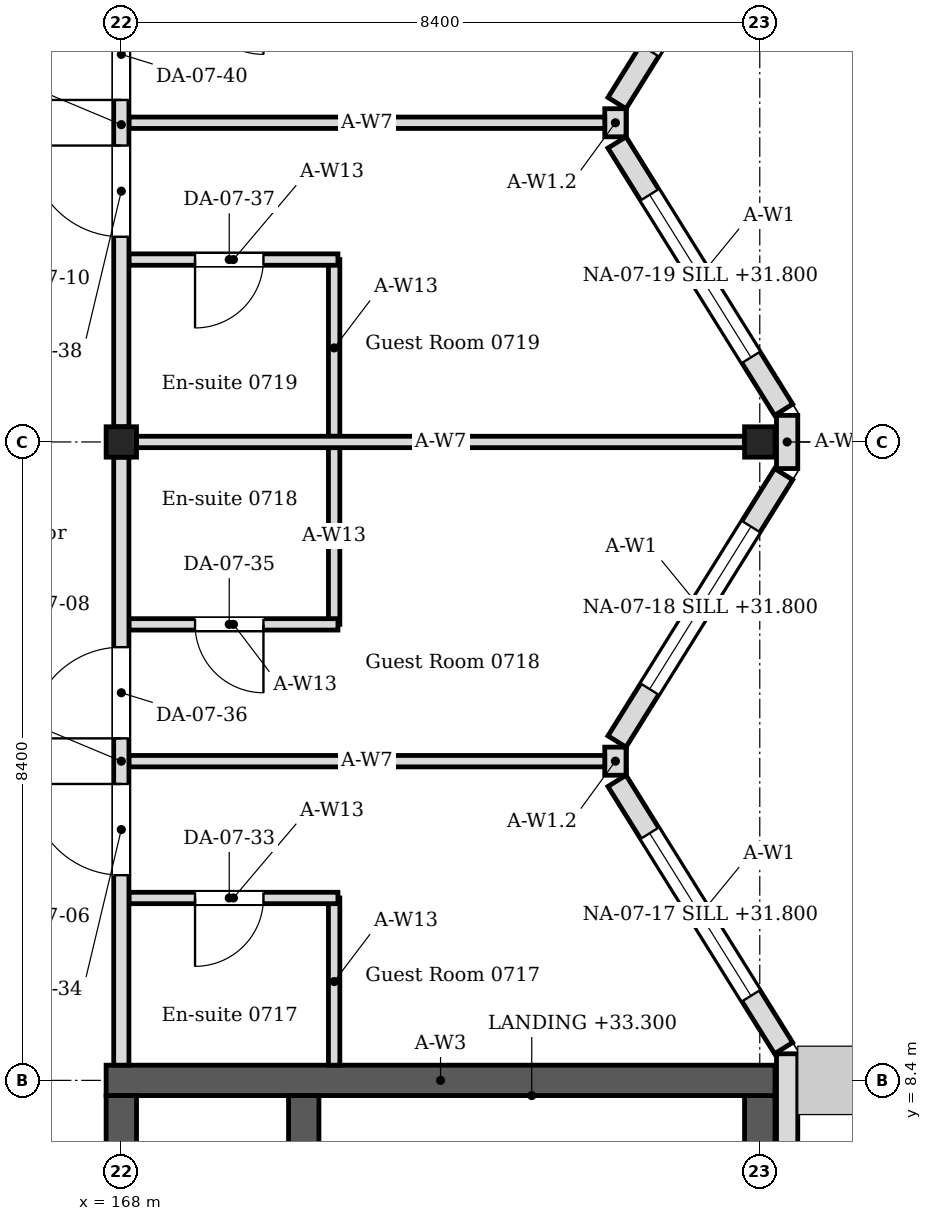
"""IFC4 building model, lengths in metres.
Left out: names, types, materials, properties, quantities, classifications, styles, units other than length and angle.
Written with IfcOpenShell. Run it as: python <this file> out.ifc"""

import sys

from ifc_helpers import new_model, si_unit, direction, frame, frame_2d, origin, origin_2d, place, context, subcontext, project, spatial, rectangle, i_section, extrude, element, fill, save


model = new_model("IFC4")
c1 = context("Model", 3, precision=1e-05, world=origin(), true_north=direction((0.0, 1.0)))
c2 = subcontext(c1, "Body", "Model", "MODEL_VIEW")
j1 = project(units=[si_unit("LENGTHUNIT", "METRE"), si_unit("PLANEANGLEUNIT", "RADIAN")], contexts=[c1])
p1 = place(None, origin())
s1 = spatial("IfcSite", under=j1, at=p1, CompositionType="ELEMENT")
p2 = place(p1, origin())
s2 = spatial("IfcBuilding", under=s1, at=p2, CompositionType="ELEMENT")
p3 = place(p2, frame((0.0, 0.0, 31.2)))
s3 = spatial("IfcBuildingStorey", under=s2, at=p3, CompositionType="ELEMENT", Elevation=31.2)
for number, where, z_axis, x_axis in (
    (1, (168.0, 16.8, 0.0), (0.0, 0.0, 1.0), (1.0, 0.0, 0.0)),
    (2, (176.4, 16.8, 0.0), (0.0, 0.0, 1.0), (1.0, 0.0, 0.0)),
):
    element("IfcColumn", number, at=place(p3, frame(where, z_axis=z_axis, x_axis=x_axis)), inside=s3, PredefinedType="COLUMN", context=c2, shape_type="SweptSolid", body=[
        extrude(i_section(OverallWidth=0.4, OverallDepth=0.4, WebThickness=0.013, FlangeThickness=0.021, FilletRadius=0.022, at=origin_2d()), origin(), (0.0, 0.0, 1.0), 4.2),
    ])
p4 = place(p3, frame((167.8, 8.4, 0.0), z_axis=(0.0, 0.0, 1.0), x_axis=(1.0, 0.0, 0.0)))
e3 = element("IfcWall", 3, at=p4, inside=s3, PredefinedType="SOLIDWALL", context=c2, shape_type="SweptSolid", body=[
    extrude(rectangle(XDim=8.8, YDim=0.4, at=frame_2d((4.4, 0.0))), origin(), (0.0, 0.0, 1.0), 4.05),
])
p5 = place(p3, frame((168.0, 0.2, 0.0), z_axis=(0.0, 0.0, 1.0), x_axis=(0.0, 1.0, 0.0)))
e4 = element("IfcWall", 4, at=p5, inside=s3, PredefinedType="SOLIDWALL", context=c2, shape_type="SweptSolid", body=[
    extrude(rectangle(XDim=8.0, YDim=0.4, at=frame_2d((4.0, 0.0))), origin(), (0.0, 0.0, 1.0), 4.05),
])
p6 = place(p5, frame((1.75, 0.0, 0.0)))
e5 = element("IfcOpeningElement", 5, at=p6, cuts=e4, PredefinedType="OPENING", context=c2, shape_type="SweptSolid", body=[
    extrude(rectangle(XDim=1.0, YDim=2.1, at=frame_2d((0.5, 1.05))), frame((0.0, 0.21, 0.0), z_axis=(0.0, -1.0, 0.0), x_axis=(1.0, 0.0, 0.0)), (0.0, 0.0, 1.0), 0.42),
])
p7 = place(p5, frame((5.675, 0.0, 0.0)))
e6 = element("IfcOpeningElement", 6, at=p7, cuts=e4, PredefinedType="OPENING", context=c2, shape_type="SweptSolid", body=[
    extrude(rectangle(XDim=1.05, YDim=2.1, at=frame_2d((0.525, 1.05))), frame((0.0, 0.21, 0.0), z_axis=(0.0, -1.0, 0.0), x_axis=(1.0, 0.0, 0.0)), (0.0, 0.0, 1.0), 0.42),
])
p8 = place(p3, frame((176.4, 0.2, 0.0), z_axis=(0.0, 0.0, 1.0), x_axis=(0.0, 1.0, 0.0)))
e7 = element("IfcWall", 7, at=p8, inside=s3, PredefinedType="SOLIDWALL", context=c2, shape_type="SweptSolid", body=[
    extrude(rectangle(XDim=8.0, YDim=0.4, at=frame_2d((4.0, 0.0))), origin(), (0.0, 0.0, 1.0), 4.05),
])
p9 = place(p3, frame((176.76, -0.22, 0.0), z_axis=(0.0, 0.0, 1.0), x_axis=(0.0, 1.0, 0.0)))
e8 = element("IfcWall", 8, at=p9, inside=s3, PredefinedType="SOLIDWALL", context=c2, shape_type="SweptSolid", body=[
    extrude(rectangle(XDim=8.97, YDim=0.28, at=frame_2d((4.485, 0.0))), origin(), (0.0, 0.0, 1.0), 4.05),
])
p10 = place(p3, frame((176.714, 8.824, 0.0), z_axis=(0.0, 0.0, 1.0), x_axis=(-0.529018946142, 0.848610013271, 0.0)))
e9 = element("IfcWall", 9, at=p10, inside=s3, PredefinedType="SOLIDWALL", context=c2, shape_type="SweptSolid", body=[
    extrude(rectangle(XDim=4.144, YDim=0.28, at=frame_2d((2.072, 0.0))), origin(), (0.0, 0.0, 1.0), 4.05),
])
p11 = place(p10, frame((0.812, 0.0, 0.6)))
e10 = element("IfcOpeningElement", 10, at=p11, cuts=e9, PredefinedType="OPENING", context=c2, shape_type="SweptSolid", body=[
    extrude(rectangle(XDim=2.52, YDim=2.4, at=frame_2d((1.26, 1.2))), frame((0.0, 0.15, 0.0), z_axis=(0.0, -1.0, 0.0), x_axis=(1.0, 0.0, 0.0)), (0.0, 0.0, 1.0), 0.3),
])
p12 = place(p3, frame((174.521, 12.859, 0.0), z_axis=(0.0, 0.0, 1.0), x_axis=(0.528992500338, 0.848626498871, 0.0)))
e11 = element("IfcWall", 11, at=p12, inside=s3, PredefinedType="SOLIDWALL", context=c2, shape_type="SweptSolid", body=[
    extrude(rectangle(XDim=4.145, YDim=0.28, at=frame_2d((2.072, 0.0))), origin(), (0.0, 0.0, 1.0), 4.05),
])
p13 = place(p12, frame((0.812, 0.0, 0.6)))
e12 = element("IfcOpeningElement", 12, at=p13, cuts=e11, PredefinedType="OPENING", context=c2, shape_type="SweptSolid", body=[
    extrude(rectangle(XDim=2.52, YDim=2.4, at=frame_2d((1.26, 1.2))), frame((0.0, 0.15, 0.0), z_axis=(0.0, -1.0, 0.0), x_axis=(1.0, 0.0, 0.0)), (0.0, 0.0, 1.0), 0.3),
])
p14 = place(p3, frame((174.5, 12.415, 0.0), z_axis=(0.0, 0.0, 1.0), x_axis=(0.0, 1.0, 0.0)))
e13 = element("IfcWall", 13, at=p14, inside=s3, PredefinedType="SOLIDWALL", context=c2, shape_type="SweptSolid", body=[
    extrude(rectangle(XDim=0.37, YDim=0.28, at=frame_2d((0.185, 0.0))), origin(), (0.0, 0.0, 1.0), 3.604),
])
p15 = place(p3, frame((176.76, 16.45, 0.0), z_axis=(0.0, 0.0, 1.0), x_axis=(0.0, 1.0, 0.0)))
e14 = element("IfcWall", 14, at=p15, inside=s3, PredefinedType="SOLIDWALL", context=c2, shape_type="SweptSolid", body=[
    extrude(rectangle(XDim=0.7, YDim=0.28, at=frame_2d((0.35, 0.0))), origin(), (0.0, 0.0, 1.0), 4.05),
])
p16 = place(p3, frame((176.714, 17.224, 0.0), z_axis=(0.0, 0.0, 1.0), x_axis=(-0.529018946142, 0.848610013271, 0.0)))
e15 = element("IfcWall", 15, at=p16, inside=s3, PredefinedType="SOLIDWALL", context=c2, shape_type="SweptSolid", body=[
    extrude(rectangle(XDim=4.144, YDim=0.28, at=frame_2d((2.072, 0.0))), origin(), (0.0, 0.0, 1.0), 4.05),
])
p17 = place(p16, frame((0.812, 0.0, 0.6)))
e16 = element("IfcOpeningElement", 16, at=p17, cuts=e15, PredefinedType="OPENING", context=c2, shape_type="SweptSolid", body=[
    extrude(rectangle(XDim=2.52, YDim=2.4, at=frame_2d((1.26, 1.2))), frame((0.0, 0.15, 0.0), z_axis=(0.0, -1.0, 0.0), x_axis=(1.0, 0.0, 0.0)), (0.0, 0.0, 1.0), 0.3),
])
p18 = place(p3, frame((174.521, 21.259, 0.0), z_axis=(0.0, 0.0, 1.0), x_axis=(0.529018946142, 0.848610013271, 0.0)))
e17 = element("IfcWall", 17, at=p18, inside=s3, PredefinedType="SOLIDWALL", context=c2, shape_type="SweptSolid", body=[
    extrude(rectangle(XDim=4.144, YDim=0.28, at=frame_2d((2.072, 0.0))), origin(), (0.0, 0.0, 1.0), 4.05),
])
p19 = place(p18, frame((0.812, 0.0, 0.6)))
e18 = element("IfcOpeningElement", 18, at=p19, cuts=e17, PredefinedType="OPENING", context=c2, shape_type="SweptSolid", body=[
    extrude(rectangle(XDim=2.52, YDim=2.4, at=frame_2d((1.26, 1.2))), frame((0.0, 0.15, 0.0), z_axis=(0.0, -1.0, 0.0), x_axis=(1.0, 0.0, 0.0)), (0.0, 0.0, 1.0), 0.3),
])
p20 = place(p3, frame((174.5, 20.815, 0.0), z_axis=(0.0, 0.0, 1.0), x_axis=(0.0, 1.0, 0.0)))
e19 = element("IfcWall", 19, at=p20, inside=s3, PredefinedType="SOLIDWALL", context=c2, shape_type="SweptSolid", body=[
    extrude(rectangle(XDim=0.37, YDim=0.28, at=frame_2d((0.185, 0.0))), origin(), (0.0, 0.0, 1.0), 3.604),
])
p21 = place(p3, frame((170.8, 8.6, 0.0), z_axis=(0.0, 0.0, 1.0), x_axis=(0.0, 1.0, 0.0)))
e20 = element("IfcWall", 20, at=p21, inside=s3, PredefinedType="PARTITIONING", context=c2, shape_type="SweptSolid", body=[
    extrude(rectangle(XDim=2.2, YDim=0.15, at=frame_2d((1.1, 0.0))), origin(), (0.0, 0.0, 1.0), 4.05),
])
p22 = place(p3, frame((170.85, 10.8, 0.0), z_axis=(0.0, 0.0, 1.0), x_axis=(-1.0, 0.0, 0.0)))
e21 = element("IfcWall", 21, at=p22, inside=s3, PredefinedType="PARTITIONING", context=c2, shape_type="SweptSolid", body=[
    extrude(rectangle(XDim=2.75, YDim=0.15, at=frame_2d((1.375, 0.0))), origin(), (0.0, 0.0, 1.0), 4.05),
])
p23 = place(p22, frame((0.98, 0.0, 0.0)))
e22 = element("IfcOpeningElement", 22, at=p23, cuts=e21, PredefinedType="OPENING", context=c2, shape_type="SweptSolid", body=[
    extrude(rectangle(XDim=0.9, YDim=2.1, at=frame_2d((0.45, 1.05))), frame((0.0, 0.085, 0.0), z_axis=(0.0, -1.0, 0.0), x_axis=(1.0, 0.0, 0.0)), (0.0, 0.0, 1.0), 0.17),
])
p24 = place(p3, frame((170.8, 14.4, 0.0), z_axis=(0.0, 0.0, 1.0), x_axis=(0.0, 1.0, 0.0)))
e23 = element("IfcWall", 23, at=p24, inside=s3, PredefinedType="PARTITIONING", context=c2, shape_type="SweptSolid", body=[
    extrude(rectangle(XDim=2.325, YDim=0.15, at=frame_2d((1.163, 0.0))), origin(), (0.0, 0.0, 1.0), 4.05),
])
p25 = place(p3, frame((170.85, 14.4, 0.0), z_axis=(0.0, 0.0, 1.0), x_axis=(-1.0, 0.0, 0.0)))
e24 = element("IfcWall", 24, at=p25, inside=s3, PredefinedType="PARTITIONING", context=c2, shape_type="SweptSolid", body=[
    extrude(rectangle(XDim=2.75, YDim=0.15, at=frame_2d((1.375, 0.0))), origin(), (0.0, 0.0, 1.0), 4.05),
])
p26 = place(p25, frame((0.98, 0.0, 0.0)))
e25 = element("IfcOpeningElement", 25, at=p26, cuts=e24, PredefinedType="OPENING", context=c2, shape_type="SweptSolid", body=[
    extrude(rectangle(XDim=0.9, YDim=2.1, at=frame_2d((0.45, 1.05))), frame((0.0, 0.085, 0.0), z_axis=(0.0, -1.0, 0.0), x_axis=(1.0, 0.0, 0.0)), (0.0, 0.0, 1.0), 0.17),
])
p27 = place(p3, frame((170.8, 16.875, 0.0), z_axis=(0.0, 0.0, 1.0), x_axis=(0.0, 1.0, 0.0)))
e26 = element("IfcWall", 26, at=p27, inside=s3, PredefinedType="PARTITIONING", context=c2, shape_type="SweptSolid", body=[
    extrude(rectangle(XDim=2.325, YDim=0.15, at=frame_2d((1.163, 0.0))), origin(), (0.0, 0.0, 1.0), 4.05),
])
p28 = place(p3, frame((170.85, 19.2, 0.0), z_axis=(0.0, 0.0, 1.0), x_axis=(-1.0, 0.0, 0.0)))
e27 = element("IfcWall", 27, at=p28, inside=s3, PredefinedType="PARTITIONING", context=c2, shape_type="SweptSolid", body=[
    extrude(rectangle(XDim=2.75, YDim=0.15, at=frame_2d((1.375, 0.0))), origin(), (0.0, 0.0, 1.0), 4.05),
])
p29 = place(p28, frame((0.98, 0.0, 0.0)))
e28 = element("IfcOpeningElement", 28, at=p29, cuts=e27, PredefinedType="OPENING", context=c2, shape_type="SweptSolid", body=[
    extrude(rectangle(XDim=0.9, YDim=2.1, at=frame_2d((0.45, 1.05))), frame((0.0, 0.085, 0.0), z_axis=(0.0, -1.0, 0.0), x_axis=(1.0, 0.0, 0.0)), (0.0, 0.0, 1.0), 0.17),
])
p30 = place(p3, frame((168.2, 16.8, 0.0), z_axis=(0.0, 0.0, 1.0), x_axis=(1.0, 0.0, 0.0)))
e29 = element("IfcWall", 29, at=p30, inside=s3, PredefinedType="PARTITIONING", context=c2, shape_type="SweptSolid", body=[
    extrude(rectangle(XDim=8.0, YDim=0.15, at=frame_2d((4.0, 0.0))), origin(), (0.0, 0.0, 1.0), 3.604),
])
for number, where, z_axis, x_axis in (
    (30, (168.1, 12.6, 0.0), (0.0, 0.0, 1.0), (1.0, 0.0, 0.0)),
    (31, (168.1, 21.0, 0.0), (0.0, 0.0, 1.0), (1.0, 0.0, 0.0)),
):
    element("IfcWall", number, at=place(p3, frame(where, z_axis=z_axis, x_axis=x_axis)), inside=s3, PredefinedType="PARTITIONING", context=c2, shape_type="SweptSolid", body=[
        extrude(rectangle(XDim=6.26, YDim=0.15, at=frame_2d((3.13, 0.0))), origin(), (0.0, 0.0, 1.0), 3.604),
    ])
p31 = place(p3, frame((168.0, 8.6, 0.0), z_axis=(0.0, 0.0, 1.0), x_axis=(0.0, 1.0, 0.0)))
e32 = element("IfcWall", 32, at=p31, inside=s3, PredefinedType="PARTITIONING", context=c2, shape_type="SweptSolid", body=[
    extrude(rectangle(XDim=8.0, YDim=0.2, at=frame_2d((4.0, 0.0))), origin(), (0.0, 0.0, 1.0), 3.45),
])
p32 = place(p31, frame((2.5, 0.0, 0.0)))
e33 = element("IfcOpeningElement", 33, at=p32, cuts=e32, PredefinedType="OPENING", context=c2, shape_type="SweptSolid", body=[
    extrude(rectangle(XDim=1.2, YDim=2.1, at=frame_2d((0.6, 1.05))), frame((0.0, 0.11, 0.0), z_axis=(0.0, -1.0, 0.0), x_axis=(1.0, 0.0, 0.0)), (0.0, 0.0, 1.0), 0.22),
])
p33 = place(p31, frame((4.3, 0.0, 0.0)))
e34 = element("IfcOpeningElement", 34, at=p33, cuts=e32, PredefinedType="OPENING", context=c2, shape_type="SweptSolid", body=[
    extrude(rectangle(XDim=1.2, YDim=2.1, at=frame_2d((0.6, 1.05))), frame((0.0, 0.11, 0.0), z_axis=(0.0, -1.0, 0.0), x_axis=(1.0, 0.0, 0.0)), (0.0, 0.0, 1.0), 0.22),
])
p34 = place(p3, frame((168.0, 17.0, 0.0), z_axis=(0.0, 0.0, 1.0), x_axis=(0.0, 1.0, 0.0)))
e35 = element("IfcWall", 35, at=p34, inside=s3, PredefinedType="PARTITIONING", context=c2, shape_type="SweptSolid", body=[
    extrude(rectangle(XDim=7.95, YDim=0.2, at=frame_2d((3.975, 0.0))), origin(), (0.0, 0.0, 1.0), 3.45),
])
p35 = place(p34, frame((2.5, 0.0, 0.0)))
e36 = element("IfcOpeningElement", 36, at=p35, cuts=e35, PredefinedType="OPENING", context=c2, shape_type="SweptSolid", body=[
    extrude(rectangle(XDim=1.2, YDim=2.1, at=frame_2d((0.6, 1.05))), frame((0.0, 0.11, 0.0), z_axis=(0.0, -1.0, 0.0), x_axis=(1.0, 0.0, 0.0)), (0.0, 0.0, 1.0), 0.22),
])
p36 = place(p34, frame((4.3, 0.0, 0.0)))
e37 = element("IfcOpeningElement", 37, at=p36, cuts=e35, PredefinedType="OPENING", context=c2, shape_type="SweptSolid", body=[
    extrude(rectangle(XDim=1.2, YDim=2.1, at=frame_2d((0.6, 1.05))), frame((0.0, 0.11, 0.0), z_axis=(0.0, -1.0, 0.0), x_axis=(1.0, 0.0, 0.0)), (0.0, 0.0, 1.0), 0.22),
])
p37 = place(p3, frame((170.4, 0.2, 0.0), z_axis=(0.0, 0.0, 1.0), x_axis=(0.0, 1.0, 0.0)))
e38 = element("IfcWall", 38, at=p37, inside=s3, PredefinedType="SOLIDWALL", context=c2, shape_type="SweptSolid", body=[
    extrude(rectangle(XDim=8.0, YDim=0.4, at=frame_2d((4.0, 0.0))), origin(), (0.0, 0.0, 1.0), 4.05),
])
p38 = place(p37, frame((0.3, 0.0, 0.0)))
e39 = element("IfcOpeningElement", 39, at=p38, cuts=e38, PredefinedType="OPENING", context=c2, shape_type="SweptSolid", body=[
    extrude(rectangle(XDim=0.9, YDim=2.1, at=frame_2d((0.45, 1.05))), frame((0.0, 0.21, 0.0), z_axis=(0.0, -1.0, 0.0), x_axis=(1.0, 0.0, 0.0)), (0.0, 0.0, 1.0), 0.42),
])
p39 = place(p11, origin())
e40 = element("IfcWindow", 40, at=p39, inside=s3, PartitioningType="SINGLE_PANEL", PredefinedType="WINDOW", context=c2, shape_type="SweptSolid", body=[
    extrude(rectangle(XDim=2.52, YDim=2.4, at=frame_2d((1.26, 1.2))), frame((0.0, 0.03, 0.0), z_axis=(0.0, -1.0, 0.0), x_axis=(1.0, 0.0, 0.0)), (0.0, 0.0, 1.0), 0.06),
])
fill(e10, e40)
p40 = place(p13, origin())
e41 = element("IfcWindow", 41, at=p40, inside=s3, PartitioningType="SINGLE_PANEL", PredefinedType="WINDOW", context=c2, shape_type="SweptSolid", body=[
    extrude(rectangle(XDim=2.52, YDim=2.4, at=frame_2d((1.26, 1.2))), frame((0.0, 0.03, 0.0), z_axis=(0.0, -1.0, 0.0), x_axis=(1.0, 0.0, 0.0)), (0.0, 0.0, 1.0), 0.06),
])
fill(e12, e41)
p41 = place(p17, origin())
e42 = element("IfcWindow", 42, at=p41, inside=s3, PartitioningType="SINGLE_PANEL", PredefinedType="WINDOW", context=c2, shape_type="SweptSolid", body=[
    extrude(rectangle(XDim=2.52, YDim=2.4, at=frame_2d((1.26, 1.2))), frame((0.0, 0.03, 0.0), z_axis=(0.0, -1.0, 0.0), x_axis=(1.0, 0.0, 0.0)), (0.0, 0.0, 1.0), 0.06),
])
fill(e16, e42)
p42 = place(p23, origin())
e43 = element("IfcDoor", 43, at=p42, inside=s3, OperationType="SINGLE_SWING_RIGHT", PredefinedType="DOOR", context=c2, shape_type="SweptSolid", body=[
    extrude(rectangle(XDim=0.9, YDim=2.1, at=frame_2d((0.45, 1.05))), frame((0.0, 0.025, 0.0), z_axis=(0.0, -1.0, 0.0), x_axis=(1.0, 0.0, 0.0)), (0.0, 0.0, 1.0), 0.05),
])
fill(e22, e43)
p43 = place(p32, origin())
e44 = element("IfcDoor", 44, at=p43, inside=s3, OperationType="SINGLE_SWING_RIGHT", PredefinedType="DOOR", context=c2, shape_type="SweptSolid", body=[
    extrude(rectangle(XDim=1.2, YDim=2.1, at=frame_2d((0.6, 1.05))), frame((0.0, 0.025, 0.0), z_axis=(0.0, -1.0, 0.0), x_axis=(1.0, 0.0, 0.0)), (0.0, 0.0, 1.0), 0.05),
])
fill(e33, e44)
p44 = place(p26, origin())
e45 = element("IfcDoor", 45, at=p44, inside=s3, OperationType="SINGLE_SWING_LEFT", PredefinedType="DOOR", context=c2, shape_type="SweptSolid", body=[
    extrude(rectangle(XDim=0.9, YDim=2.1, at=frame_2d((0.45, 1.05))), frame((0.0, 0.025, 0.0), z_axis=(0.0, -1.0, 0.0), x_axis=(1.0, 0.0, 0.0)), (0.0, 0.0, 1.0), 0.05),
])
fill(e25, e45)
p45 = place(p33, origin())
e46 = element("IfcDoor", 46, at=p45, inside=s3, OperationType="SINGLE_SWING_LEFT", PredefinedType="DOOR", context=c2, shape_type="SweptSolid", body=[
    extrude(rectangle(XDim=1.2, YDim=2.1, at=frame_2d((0.6, 1.05))), frame((0.0, 0.025, 0.0), z_axis=(0.0, -1.0, 0.0), x_axis=(1.0, 0.0, 0.0)), (0.0, 0.0, 1.0), 0.05),
])
fill(e34, e46)
p46 = place(p29, origin())
e47 = element("IfcDoor", 47, at=p46, inside=s3, OperationType="SINGLE_SWING_RIGHT", PredefinedType="DOOR", context=c2, shape_type="SweptSolid", body=[
    extrude(rectangle(XDim=0.9, YDim=2.1, at=frame_2d((0.45, 1.05))), frame((0.0, 0.025, 0.0), z_axis=(0.0, -1.0, 0.0), x_axis=(1.0, 0.0, 0.0)), (0.0, 0.0, 1.0), 0.05),
])
fill(e28, e47)
p47 = place(p35, origin())
e48 = element("IfcDoor", 48, at=p47, inside=s3, OperationType="SINGLE_SWING_RIGHT", PredefinedType="DOOR", context=c2, shape_type="SweptSolid", body=[
    extrude(rectangle(XDim=1.2, YDim=2.1, at=frame_2d((0.6, 1.05))), frame((0.0, 0.025, 0.0), z_axis=(0.0, -1.0, 0.0), x_axis=(1.0, 0.0, 0.0)), (0.0, 0.0, 1.0), 0.05),
])
fill(e36, e48)
p48 = place(p36, origin())
e49 = element("IfcDoor", 49, at=p48, inside=s3, OperationType="SINGLE_SWING_LEFT", PredefinedType="DOOR", context=c2, shape_type="SweptSolid", body=[
    extrude(rectangle(XDim=1.2, YDim=2.1, at=frame_2d((0.6, 1.05))), frame((0.0, 0.025, 0.0), z_axis=(0.0, -1.0, 0.0), x_axis=(1.0, 0.0, 0.0)), (0.0, 0.0, 1.0), 0.05),
])
fill(e37, e49)
save(model, sys.argv[1])
